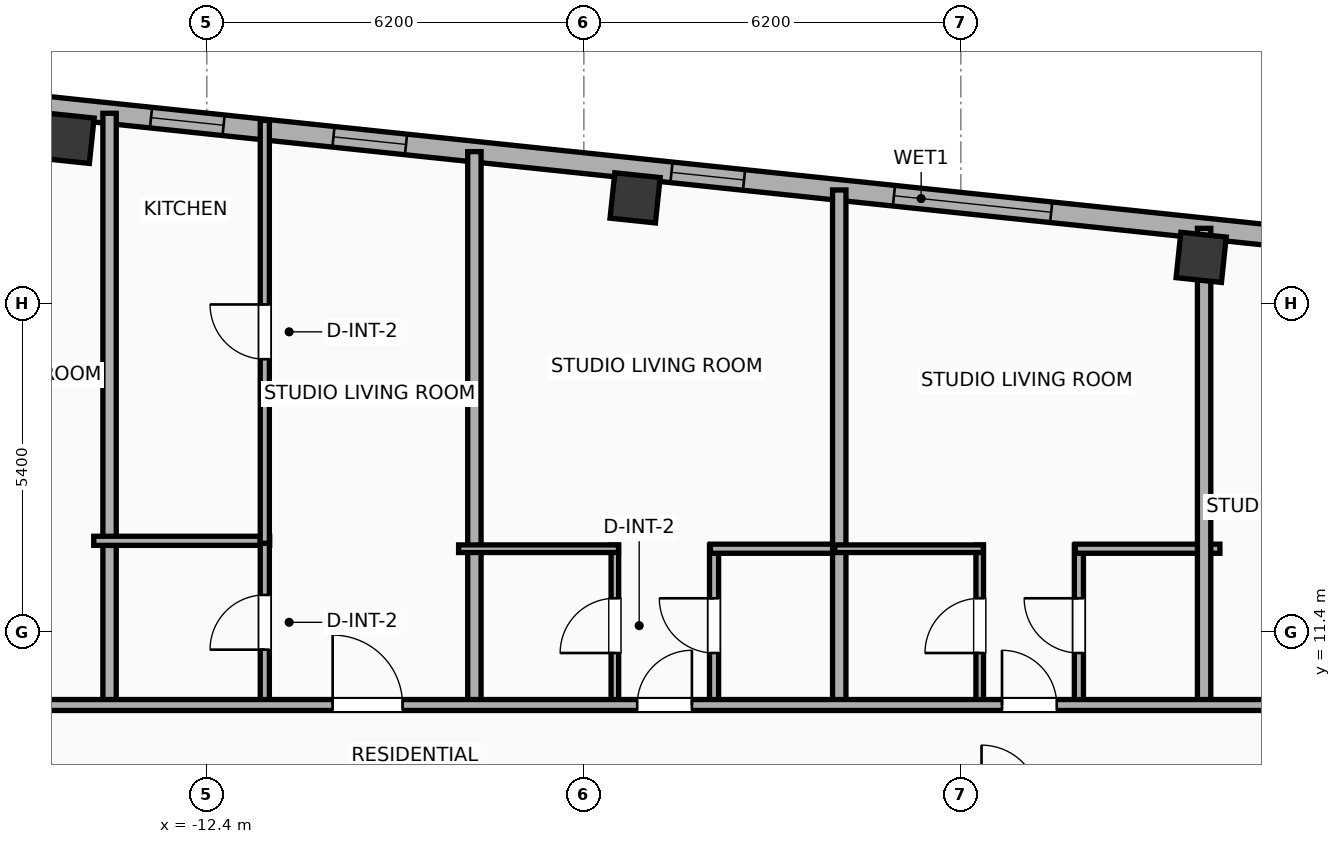
"""IFC4 building model, lengths in metres.
Left out: names, types, materials, properties, quantities, classifications, styles, units other than length and angle.
Written with IfcOpenShell. Run it as: python <this file> out.ifc"""

import sys

from ifc_helpers import new_model, si_unit, direction, frame, frame_2d, origin, origin_2d, place, context, subcontext, project, spatial, rectangle, hollow_rectangle, extrude, element, fill, save


model = new_model("IFC4")
c1 = context("Model", 3, precision=1e-05, world=origin(), true_north=direction((0.0, 1.0)))
c2 = subcontext(c1, "Body", "Model", "MODEL_VIEW")
j1 = project(units=[si_unit("LENGTHUNIT", "METRE"), si_unit("PLANEANGLEUNIT", "RADIAN")], contexts=[c1])
p1 = place(None, origin())
s1 = spatial("IfcSite", under=j1, at=p1, CompositionType="ELEMENT")
p2 = place(p1, origin())
s2 = spatial("IfcBuilding", under=s1, at=p2, CompositionType="ELEMENT")
p3 = place(p2, frame((0.0, 0.0, 295.1)))
s3 = spatial("IfcBuildingStorey", under=s2, at=p3, CompositionType="ELEMENT", Elevation=295.1)
for number, where, z_axis, x_axis in (
    (1, (3.952, 17.561, 0.0), (0.0, 0.0, 1.0), (0.995, -0.105, 0.0)),
    (2, (-5.357, 18.54, 0.0), (0.0, 0.0, 1.0), (0.995, -0.105, 0.0)),
    (3, (-14.666, 19.518, 0.0), (0.0, 0.0, 1.0), (0.995, -0.105, 0.0)),
):
    element("IfcColumn", number, at=place(p3, frame(where, z_axis=z_axis, x_axis=x_axis)), inside=s3, PredefinedType="COLUMN", context=c2, shape_type="SweptSolid", body=[
        extrude(hollow_rectangle(XDim=0.75, YDim=0.75, WallThickness=0.025, at=origin_2d()), origin(), (0.0, 0.0, 1.0), 3.9),
    ])
p4 = place(p3, frame((-23.908, 20.972, 0.0), z_axis=(0.0, 0.0, 1.0), x_axis=(0.994521888554, -0.104528528102, 0.0)))
e4 = element("IfcWall", 4, at=p4, inside=s3, PredefinedType="ELEMENTEDWALL", context=c2, shape_type="SweptSolid", body=[
    extrude(rectangle(XDim=46.766, YDim=0.34, at=frame_2d((23.383, 0.0))), origin(), (0.0, 0.0, 1.0), 3.635),
])
p5 = place(p4, frame((22.933, 0.0, 0.65)))
e5 = element("IfcOpeningElement", 5, at=p5, cuts=e4, PredefinedType="OPENING", context=c2, shape_type="SweptSolid", body=[
    extrude(rectangle(XDim=2.6, YDim=2.45, at=frame_2d((1.3, 1.225))), frame((0.0, 0.18, 0.0), z_axis=(0.0, -1.0, 0.0), x_axis=(1.0, 0.0, 0.0)), (0.0, 0.0, 1.0), 0.36),
])
p6 = place(p4, frame((1.812, 0.0, 0.75)))
e6 = element("IfcOpeningElement", 6, at=p6, cuts=e4, PredefinedType="OPENING", context=c2, shape_type="SweptSolid", body=[
    extrude(rectangle(XDim=1.2, YDim=2.05, at=frame_2d((0.6, 1.025))), frame((0.0, 0.18, 0.0), z_axis=(0.0, -1.0, 0.0), x_axis=(1.0, 0.0, 0.0)), (0.0, 0.0, 1.0), 0.36),
])
p7 = place(p4, frame((7.481, 0.0, 0.75)))
e7 = element("IfcOpeningElement", 7, at=p7, cuts=e4, PredefinedType="OPENING", context=c2, shape_type="SweptSolid", body=[
    extrude(rectangle(XDim=1.2, YDim=2.05, at=frame_2d((0.6, 1.025))), frame((0.0, 0.18, 0.0), z_axis=(0.0, -1.0, 0.0), x_axis=(1.0, 0.0, 0.0)), (0.0, 0.0, 1.0), 0.36),
])
p8 = place(p4, frame((4.464, 0.0, 0.75)))
e8 = element("IfcOpeningElement", 8, at=p8, cuts=e4, PredefinedType="OPENING", context=c2, shape_type="SweptSolid", body=[
    extrude(rectangle(XDim=1.2, YDim=2.05, at=frame_2d((0.6, 1.025))), frame((0.0, 0.18, 0.0), z_axis=(0.0, -1.0, 0.0), x_axis=(1.0, 0.0, 0.0)), (0.0, 0.0, 1.0), 0.36),
])
p9 = place(p4, frame((13.665, 0.0, 0.75)))
e9 = element("IfcOpeningElement", 9, at=p9, cuts=e4, PredefinedType="OPENING", context=c2, shape_type="SweptSolid", body=[
    extrude(rectangle(XDim=1.2, YDim=2.05, at=frame_2d((0.6, 1.025))), frame((0.0, 0.18, 0.0), z_axis=(0.0, -1.0, 0.0), x_axis=(1.0, 0.0, 0.0)), (0.0, 0.0, 1.0), 0.36),
])
p10 = place(p4, frame((10.648, 0.0, 0.75)))
e10 = element("IfcOpeningElement", 10, at=p10, cuts=e4, PredefinedType="OPENING", context=c2, shape_type="SweptSolid", body=[
    extrude(rectangle(XDim=1.2, YDim=2.05, at=frame_2d((0.6, 1.025))), frame((0.0, 0.18, 0.0), z_axis=(0.0, -1.0, 0.0), x_axis=(1.0, 0.0, 0.0)), (0.0, 0.0, 1.0), 0.36),
])
p11 = place(p4, frame((19.254, 0.0, 0.75)))
e11 = element("IfcOpeningElement", 11, at=p11, cuts=e4, PredefinedType="OPENING", context=c2, shape_type="SweptSolid", body=[
    extrude(rectangle(XDim=1.2, YDim=2.05, at=frame_2d((0.6, 1.025))), frame((0.0, 0.18, 0.0), z_axis=(0.0, -1.0, 0.0), x_axis=(1.0, 0.0, 0.0)), (0.0, 0.0, 1.0), 0.36),
])
p12 = place(p4, frame((29.247, 0.0, 0.75)))
e12 = element("IfcOpeningElement", 12, at=p12, cuts=e4, PredefinedType="OPENING", context=c2, shape_type="SweptSolid", body=[
    extrude(rectangle(XDim=1.2, YDim=2.05, at=frame_2d((0.6, 1.025))), frame((0.0, 0.18, 0.0), z_axis=(0.0, -1.0, 0.0), x_axis=(1.0, 0.0, 0.0)), (0.0, 0.0, 1.0), 0.36),
])
p13 = place(p4, frame((32.264, 0.0, 0.75)))
e13 = element("IfcOpeningElement", 13, at=p13, cuts=e4, PredefinedType="OPENING", context=c2, shape_type="SweptSolid", body=[
    extrude(rectangle(XDim=1.2, YDim=2.05, at=frame_2d((0.6, 1.025))), frame((0.0, 0.18, 0.0), z_axis=(0.0, -1.0, 0.0), x_axis=(1.0, 0.0, 0.0)), (0.0, 0.0, 1.0), 0.36),
])
p14 = place(p4, frame((35.553, 0.0, 0.75)))
e14 = element("IfcOpeningElement", 14, at=p14, cuts=e4, PredefinedType="OPENING", context=c2, shape_type="SweptSolid", body=[
    extrude(rectangle(XDim=1.2, YDim=2.05, at=frame_2d((0.6, 1.025))), frame((0.0, 0.18, 0.0), z_axis=(0.0, -1.0, 0.0), x_axis=(1.0, 0.0, 0.0)), (0.0, 0.0, 1.0), 0.36),
])
p15 = place(p4, frame((42.402, 0.0, 0.75)))
e15 = element("IfcOpeningElement", 15, at=p15, cuts=e4, PredefinedType="OPENING", context=c2, shape_type="SweptSolid", body=[
    extrude(rectangle(XDim=1.2, YDim=2.05, at=frame_2d((0.6, 1.025))), frame((0.0, 0.18, 0.0), z_axis=(0.0, -1.0, 0.0), x_axis=(1.0, 0.0, 0.0)), (0.0, 0.0, 1.0), 0.36),
])
p16 = place(p3, frame((-14.0, 10.12, 0.0), z_axis=(0.0, 0.0, 1.0), x_axis=(0.0, 1.0, 0.0)))
e16 = element("IfcWall", 16, at=p16, inside=s3, PredefinedType="PARTITIONING", context=c2, shape_type="SweptSolid", body=[
    extrude(rectangle(XDim=9.811, YDim=0.22, at=frame_2d((4.905, 0.0))), origin(), (0.0, 0.0, 1.0), 3.635),
])
p17 = place(p3, frame((-14.26, 12.9, 0.0), z_axis=(0.0, 0.0, 1.0), x_axis=(1.0, 0.0, 0.0)))
e17 = element("IfcWall", 17, at=p17, inside=s3, PredefinedType="PLUMBINGWALL", context=c2, shape_type="SweptSolid", body=[
    extrude(rectangle(XDim=2.893, YDim=0.15, at=frame_2d((1.447, 0.0))), origin(), (0.0, 0.0, 1.0), 3.635),
])
p18 = place(p3, frame((-11.447, 10.18, 0.0), z_axis=(0.0, 0.0, 1.0), x_axis=(0.0, 1.0, 0.0)))
e18 = element("IfcWall", 18, at=p18, inside=s3, PredefinedType="PLUMBINGWALL", context=c2, shape_type="SweptSolid", body=[
    extrude(rectangle(XDim=2.76, YDim=0.15, at=frame_2d((1.38, 0.0))), origin(), (0.0, 0.0, 1.0), 3.635),
])
p19 = place(p18, frame((0.93, 0.0, 0.0)))
e19 = element("IfcOpeningElement", 19, at=p19, cuts=e18, PredefinedType="OPENING", context=c2, shape_type="SweptSolid", body=[
    extrude(rectangle(XDim=0.9, YDim=2.05, at=frame_2d((0.45, 1.025))), frame((0.0, 0.085, 0.0), z_axis=(0.0, -1.0, 0.0), x_axis=(1.0, 0.0, 0.0)), (0.0, 0.0, 1.0), 0.17),
])
p20 = place(p3, frame((-11.447, 12.86, 0.0), z_axis=(0.0, 0.0, 1.0), x_axis=(0.0, 1.0, 0.0)))
e20 = element("IfcWall", 20, at=p20, inside=s3, PredefinedType="PLUMBINGWALL", context=c2, shape_type="SweptSolid", body=[
    extrude(rectangle(XDim=6.953, YDim=0.15, at=frame_2d((3.477, 0.0))), origin(), (0.0, 0.0, 1.0), 3.635),
])
p21 = place(p20, frame((3.027, 0.0, 0.0)))
e21 = element("IfcOpeningElement", 21, at=p21, cuts=e20, PredefinedType="OPENING", context=c2, shape_type="SweptSolid", body=[
    extrude(rectangle(XDim=0.9, YDim=2.05, at=frame_2d((0.45, 1.025))), frame((0.0, 0.085, 0.0), z_axis=(0.0, -1.0, 0.0), x_axis=(1.0, 0.0, 0.0)), (0.0, 0.0, 1.0), 0.17),
])
p22 = place(p3, frame((-8.0, 10.12, 0.0), z_axis=(0.0, 0.0, 1.0), x_axis=(0.0, 1.0, 0.0)))
e22 = element("IfcWall", 22, at=p22, inside=s3, PredefinedType="PARTITIONING", context=c2, shape_type="SweptSolid", body=[
    extrude(rectangle(XDim=9.18, YDim=0.22, at=frame_2d((4.59, 0.0))), origin(), (0.0, 0.0, 1.0), 3.635),
])
p23 = place(p3, frame((-5.69, 10.18, 0.0), z_axis=(0.0, 0.0, 1.0), x_axis=(0.0, 1.0, 0.0)))
e23 = element("IfcWall", 23, at=p23, inside=s3, PredefinedType="PARTITIONING", context=c2, shape_type="SweptSolid", body=[
    extrude(rectangle(XDim=2.65, YDim=0.125, at=frame_2d((1.325, 0.0))), origin(), (0.0, 0.0, 1.0), 3.635),
])
p24 = place(p23, frame((0.875, 0.0, 0.0)))
e24 = element("IfcOpeningElement", 24, at=p24, cuts=e23, PredefinedType="OPENING", context=c2, shape_type="SweptSolid", body=[
    extrude(rectangle(XDim=0.9, YDim=2.05, at=frame_2d((0.45, 1.025))), frame((0.0, 0.073, 0.0), z_axis=(0.0, -1.0, 0.0), x_axis=(1.0, 0.0, 0.0)), (0.0, 0.0, 1.0), 0.145),
])
p25 = place(p3, frame((-4.059, 10.18, 0.0), z_axis=(0.0, 0.0, 1.0), x_axis=(0.0, 1.0, 0.0)))
e25 = element("IfcWall", 25, at=p25, inside=s3, PredefinedType="PLUMBINGWALL", context=c2, shape_type="SweptSolid", body=[
    extrude(rectangle(XDim=2.65, YDim=0.15, at=frame_2d((1.325, 0.0))), origin(), (0.0, 0.0, 1.0), 3.635),
])
p26 = place(p25, frame((0.875, 0.0, 0.0)))
e26 = element("IfcOpeningElement", 26, at=p26, cuts=e25, PredefinedType="OPENING", context=c2, shape_type="SweptSolid", body=[
    extrude(rectangle(XDim=0.9, YDim=2.05, at=frame_2d((0.45, 1.025))), frame((0.0, 0.085, 0.0), z_axis=(0.0, -1.0, 0.0), x_axis=(1.0, 0.0, 0.0)), (0.0, 0.0, 1.0), 0.17),
])
p27 = place(p3, frame((-8.26, 12.77, 0.0), z_axis=(0.0, 0.0, 1.0), x_axis=(1.0, 0.0, 0.0)))
e27 = element("IfcWall", 27, at=p27, inside=s3, PredefinedType="PARTITIONING", context=c2, shape_type="SweptSolid", body=[
    extrude(rectangle(XDim=2.63, YDim=0.125, at=frame_2d((1.315, 0.0))), origin(), (0.0, 0.0, 1.0), 3.635),
])
p28 = place(p3, frame((-4.119, 12.77, 0.0), z_axis=(0.0, 0.0, 1.0), x_axis=(1.0, 0.0, 0.0)))
e28 = element("IfcWall", 28, at=p28, inside=s3, PredefinedType="PLUMBINGWALL", context=c2, shape_type="SweptSolid", body=[
    extrude(rectangle(XDim=2.194, YDim=0.15, at=frame_2d((1.097, 0.0))), origin(), (0.0, 0.0, 1.0), 3.635),
])
p29 = place(p3, frame((-2.0, 10.12, 0.0), z_axis=(0.0, 0.0, 1.0), x_axis=(0.0, 1.0, 0.0)))
e29 = element("IfcWall", 29, at=p29, inside=s3, PredefinedType="PARTITIONING", context=c2, shape_type="SweptSolid", body=[
    extrude(rectangle(XDim=8.55, YDim=0.22, at=frame_2d((4.275, 0.0))), origin(), (0.0, 0.0, 1.0), 3.635),
])
p30 = place(p3, frame((0.31, 10.18, 0.0), z_axis=(0.0, 0.0, 1.0), x_axis=(0.0, 1.0, 0.0)))
e30 = element("IfcWall", 30, at=p30, inside=s3, PredefinedType="PARTITIONING", context=c2, shape_type="SweptSolid", body=[
    extrude(rectangle(XDim=2.65, YDim=0.125, at=frame_2d((1.325, 0.0))), origin(), (0.0, 0.0, 1.0), 3.635),
])
p31 = place(p30, frame((0.875, 0.0, 0.0)))
e31 = element("IfcOpeningElement", 31, at=p31, cuts=e30, PredefinedType="OPENING", context=c2, shape_type="SweptSolid", body=[
    extrude(rectangle(XDim=0.9, YDim=2.05, at=frame_2d((0.45, 1.025))), frame((0.0, 0.073, 0.0), z_axis=(0.0, -1.0, 0.0), x_axis=(1.0, 0.0, 0.0)), (0.0, 0.0, 1.0), 0.145),
])
p32 = place(p3, frame((1.941, 10.18, 0.0), z_axis=(0.0, 0.0, 1.0), x_axis=(0.0, 1.0, 0.0)))
e32 = element("IfcWall", 32, at=p32, inside=s3, PredefinedType="PLUMBINGWALL", context=c2, shape_type="SweptSolid", body=[
    extrude(rectangle(XDim=2.65, YDim=0.15, at=frame_2d((1.325, 0.0))), origin(), (0.0, 0.0, 1.0), 3.635),
])
p33 = place(p32, frame((0.875, 0.0, 0.0)))
e33 = element("IfcOpeningElement", 33, at=p33, cuts=e32, PredefinedType="OPENING", context=c2, shape_type="SweptSolid", body=[
    extrude(rectangle(XDim=0.9, YDim=2.05, at=frame_2d((0.45, 1.025))), frame((0.0, 0.085, 0.0), z_axis=(0.0, -1.0, 0.0), x_axis=(1.0, 0.0, 0.0)), (0.0, 0.0, 1.0), 0.17),
])
p34 = place(p3, frame((-2.075, 12.77, 0.0), z_axis=(0.0, 0.0, 1.0), x_axis=(1.0, 0.0, 0.0)))
e34 = element("IfcWall", 34, at=p34, inside=s3, PredefinedType="PARTITIONING", context=c2, shape_type="SweptSolid", body=[
    extrude(rectangle(XDim=2.445, YDim=0.125, at=frame_2d((1.223, 0.0))), origin(), (0.0, 0.0, 1.0), 3.635),
])
p35 = place(p3, frame((1.881, 12.77, 0.0), z_axis=(0.0, 0.0, 1.0), x_axis=(1.0, 0.0, 0.0)))
e35 = element("IfcWall", 35, at=p35, inside=s3, PredefinedType="PLUMBINGWALL", context=c2, shape_type="SweptSolid", body=[
    extrude(rectangle(XDim=2.379, YDim=0.15, at=frame_2d((1.189, 0.0))), origin(), (0.0, 0.0, 1.0), 3.635),
])
p36 = place(p3, frame((4.0, 10.12, 0.0), z_axis=(0.0, 0.0, 1.0), x_axis=(0.0, 1.0, 0.0)))
e36 = element("IfcWall", 36, at=p36, inside=s3, PredefinedType="PARTITIONING", context=c2, shape_type="SweptSolid", body=[
    extrude(rectangle(XDim=7.919, YDim=0.22, at=frame_2d((3.959, 0.0))), origin(), (0.0, 0.0, 1.0), 3.075),
])
p37 = place(p3, frame((-28.506, 10.2, 0.0), z_axis=(0.0, 0.0, 1.0), x_axis=(1.0, 0.0, 0.0)))
e37 = element("IfcWall", 37, at=p37, inside=s3, PredefinedType="PARTITIONING", context=c2, shape_type="SweptSolid", body=[
    extrude(rectangle(XDim=53.956, YDim=0.18, at=frame_2d((26.978, 0.0))), origin(), (0.0, 0.0, 1.0), 3.635),
])
p38 = place(p37, frame((3.828, 0.0, 0.0)))
e38 = element("IfcOpeningElement", 38, at=p38, cuts=e37, PredefinedType="OPENING", context=c2, shape_type="SweptSolid", body=[
    extrude(rectangle(XDim=1.15, YDim=2.05, at=frame_2d((0.575, 1.025))), frame((0.0, 0.1, 0.0), z_axis=(0.0, -1.0, 0.0), x_axis=(1.0, 0.0, 0.0)), (0.0, 0.0, 1.0), 0.2),
])
p39 = place(p37, frame((12.029, 0.0, 0.0)))
e39 = element("IfcOpeningElement", 39, at=p39, cuts=e37, PredefinedType="OPENING", context=c2, shape_type="SweptSolid", body=[
    extrude(rectangle(XDim=1.15, YDim=2.05, at=frame_2d((0.575, 1.025))), frame((0.0, 0.1, 0.0), z_axis=(0.0, -1.0, 0.0), x_axis=(1.0, 0.0, 0.0)), (0.0, 0.0, 1.0), 0.2),
])
p40 = place(p37, frame((18.175, 0.0, 0.0)))
e40 = element("IfcOpeningElement", 40, at=p40, cuts=e37, PredefinedType="OPENING", context=c2, shape_type="SweptSolid", body=[
    extrude(rectangle(XDim=1.15, YDim=2.05, at=frame_2d((0.575, 1.025))), frame((0.0, 0.1, 0.0), z_axis=(0.0, -1.0, 0.0), x_axis=(1.0, 0.0, 0.0)), (0.0, 0.0, 1.0), 0.2),
])
p41 = place(p37, frame((23.183, 0.0, 0.0)))
e41 = element("IfcOpeningElement", 41, at=p41, cuts=e37, PredefinedType="OPENING", context=c2, shape_type="SweptSolid", body=[
    extrude(rectangle(XDim=0.9, YDim=2.05, at=frame_2d((0.45, 1.025))), frame((0.0, 0.1, 0.0), z_axis=(0.0, -1.0, 0.0), x_axis=(1.0, 0.0, 0.0)), (0.0, 0.0, 1.0), 0.2),
])
p42 = place(p37, frame((29.182, 0.0, 0.0)))
e42 = element("IfcOpeningElement", 42, at=p42, cuts=e37, PredefinedType="OPENING", context=c2, shape_type="SweptSolid", body=[
    extrude(rectangle(XDim=0.9, YDim=2.05, at=frame_2d((0.45, 1.025))), frame((0.0, 0.1, 0.0), z_axis=(0.0, -1.0, 0.0), x_axis=(1.0, 0.0, 0.0)), (0.0, 0.0, 1.0), 0.2),
])
p43 = place(p37, frame((33.735, 0.0, 0.0)))
e43 = element("IfcOpeningElement", 43, at=p43, cuts=e37, PredefinedType="OPENING", context=c2, shape_type="SweptSolid", body=[
    extrude(rectangle(XDim=1.15, YDim=2.05, at=frame_2d((0.575, 1.025))), frame((0.0, 0.1, 0.0), z_axis=(0.0, -1.0, 0.0), x_axis=(1.0, 0.0, 0.0)), (0.0, 0.0, 1.0), 0.2),
])
p44 = place(p37, frame((41.182, 0.0, 0.0)))
e44 = element("IfcOpeningElement", 44, at=p44, cuts=e37, PredefinedType="OPENING", context=c2, shape_type="SweptSolid", body=[
    extrude(rectangle(XDim=0.9, YDim=2.05, at=frame_2d((0.45, 1.025))), frame((0.0, 0.1, 0.0), z_axis=(0.0, -1.0, 0.0), x_axis=(1.0, 0.0, 0.0)), (0.0, 0.0, 1.0), 0.2),
])
p45 = place(p37, frame((49.114, 0.0, 0.0)))
e45 = element("IfcOpeningElement", 45, at=p45, cuts=e37, PredefinedType="OPENING", context=c2, shape_type="SweptSolid", body=[
    extrude(rectangle(XDim=0.9, YDim=2.05, at=frame_2d((0.45, 1.025))), frame((0.0, 0.1, 0.0), z_axis=(0.0, -1.0, 0.0), x_axis=(1.0, 0.0, 0.0)), (0.0, 0.0, 1.0), 0.2),
])
p46 = place(p5, origin())
e46 = element("IfcWindow", 46, at=p46, inside=s3, PartitioningType="SINGLE_PANEL", PredefinedType="WINDOW", context=c2, shape_type="SweptSolid", body=[
    extrude(rectangle(XDim=2.6, YDim=2.45, at=frame_2d((1.3, 1.225))), frame((0.0, 0.03, 0.0), z_axis=(0.0, -1.0, 0.0), x_axis=(1.0, 0.0, 0.0)), (0.0, 0.0, 1.0), 0.06),
])
fill(e5, e46)
p47 = place(p9, origin())
e47 = element("IfcWindow", 47, at=p47, inside=s3, PartitioningType="SINGLE_PANEL", PredefinedType="WINDOW", context=c2, shape_type="SweptSolid", body=[
    extrude(rectangle(XDim=1.2, YDim=2.05, at=frame_2d((0.6, 1.025))), frame((0.0, 0.03, 0.0), z_axis=(0.0, -1.0, 0.0), x_axis=(1.0, 0.0, 0.0)), (0.0, 0.0, 1.0), 0.06),
])
fill(e9, e47)
p48 = place(p10, origin())
e48 = element("IfcWindow", 48, at=p48, inside=s3, PartitioningType="SINGLE_PANEL", PredefinedType="WINDOW", context=c2, shape_type="SweptSolid", body=[
    extrude(rectangle(XDim=1.2, YDim=2.05, at=frame_2d((0.6, 1.025))), frame((0.0, 0.03, 0.0), z_axis=(0.0, -1.0, 0.0), x_axis=(1.0, 0.0, 0.0)), (0.0, 0.0, 1.0), 0.06),
])
fill(e10, e48)
p49 = place(p11, origin())
e49 = element("IfcWindow", 49, at=p49, inside=s3, PartitioningType="SINGLE_PANEL", PredefinedType="WINDOW", context=c2, shape_type="SweptSolid", body=[
    extrude(rectangle(XDim=1.2, YDim=2.05, at=frame_2d((0.6, 1.025))), frame((0.0, 0.03, 0.0), z_axis=(0.0, -1.0, 0.0), x_axis=(1.0, 0.0, 0.0)), (0.0, 0.0, 1.0), 0.06),
])
fill(e11, e49)
p50 = place(p19, origin())
e50 = element("IfcDoor", 50, at=p50, inside=s3, OperationType="SINGLE_SWING_LEFT", PredefinedType="DOOR", context=c2, shape_type="SweptSolid", body=[
    extrude(rectangle(XDim=0.9, YDim=2.05, at=frame_2d((0.45, 1.025))), frame((0.0, 0.025, 0.0), z_axis=(0.0, -1.0, 0.0), x_axis=(1.0, 0.0, 0.0)), (0.0, 0.0, 1.0), 0.05),
])
fill(e19, e50)
p51 = place(p21, origin())
e51 = element("IfcDoor", 51, at=p51, inside=s3, OperationType="SINGLE_SWING_RIGHT", PredefinedType="DOOR", context=c2, shape_type="SweptSolid", body=[
    extrude(rectangle(XDim=0.9, YDim=2.05, at=frame_2d((0.45, 1.025))), frame((0.0, 0.025, 0.0), z_axis=(0.0, -1.0, 0.0), x_axis=(1.0, 0.0, 0.0)), (0.0, 0.0, 1.0), 0.05),
])
fill(e21, e51)
p52 = place(p24, origin())
e52 = element("IfcDoor", 52, at=p52, inside=s3, OperationType="SINGLE_SWING_LEFT", PredefinedType="DOOR", context=c2, shape_type="SweptSolid", body=[
    extrude(rectangle(XDim=0.9, YDim=2.05, at=frame_2d((0.45, 1.025))), frame((0.0, 0.025, 0.0), z_axis=(0.0, -1.0, 0.0), x_axis=(1.0, 0.0, 0.0)), (0.0, 0.0, 1.0), 0.05),
])
fill(e24, e52)
p53 = place(p26, origin())
e53 = element("IfcDoor", 53, at=p53, inside=s3, OperationType="SINGLE_SWING_RIGHT", PredefinedType="DOOR", context=c2, shape_type="SweptSolid", body=[
    extrude(rectangle(XDim=0.9, YDim=2.05, at=frame_2d((0.45, 1.025))), frame((0.0, 0.025, 0.0), z_axis=(0.0, -1.0, 0.0), x_axis=(1.0, 0.0, 0.0)), (0.0, 0.0, 1.0), 0.05),
])
fill(e26, e53)
p54 = place(p31, origin())
e54 = element("IfcDoor", 54, at=p54, inside=s3, OperationType="SINGLE_SWING_LEFT", PredefinedType="DOOR", context=c2, shape_type="SweptSolid", body=[
    extrude(rectangle(XDim=0.9, YDim=2.05, at=frame_2d((0.45, 1.025))), frame((0.0, 0.025, 0.0), z_axis=(0.0, -1.0, 0.0), x_axis=(1.0, 0.0, 0.0)), (0.0, 0.0, 1.0), 0.05),
])
fill(e31, e54)
p55 = place(p33, origin())
e55 = element("IfcDoor", 55, at=p55, inside=s3, OperationType="SINGLE_SWING_RIGHT", PredefinedType="DOOR", context=c2, shape_type="SweptSolid", body=[
    extrude(rectangle(XDim=0.9, YDim=2.05, at=frame_2d((0.45, 1.025))), frame((0.0, 0.025, 0.0), z_axis=(0.0, -1.0, 0.0), x_axis=(1.0, 0.0, 0.0)), (0.0, 0.0, 1.0), 0.05),
])
fill(e33, e55)
p56 = place(p40, origin())
e56 = element("IfcDoor", 56, at=p56, inside=s3, OperationType="SINGLE_SWING_LEFT", PredefinedType="DOOR", context=c2, shape_type="SweptSolid", body=[
    extrude(rectangle(XDim=1.15, YDim=2.05, at=frame_2d((0.575, 1.025))), frame((0.0, 0.025, 0.0), z_axis=(0.0, -1.0, 0.0), x_axis=(1.0, 0.0, 0.0)), (0.0, 0.0, 1.0), 0.05),
])
fill(e40, e56)
p57 = place(p41, origin())
e57 = element("IfcDoor", 57, at=p57, inside=s3, OperationType="SINGLE_SWING_RIGHT", PredefinedType="DOOR", context=c2, shape_type="SweptSolid", body=[
    extrude(rectangle(XDim=0.9, YDim=2.05, at=frame_2d((0.45, 1.025))), frame((0.0, 0.025, 0.0), z_axis=(0.0, -1.0, 0.0), x_axis=(1.0, 0.0, 0.0)), (0.0, 0.0, 1.0), 0.05),
])
fill(e41, e57)
p58 = place(p42, origin())
e58 = element("IfcDoor", 58, at=p58, inside=s3, OperationType="SINGLE_SWING_LEFT", PredefinedType="DOOR", context=c2, shape_type="SweptSolid", body=[
    extrude(rectangle(XDim=0.9, YDim=2.05, at=frame_2d((0.45, 1.025))), frame((0.0, 0.025, 0.0), z_axis=(0.0, -1.0, 0.0), x_axis=(1.0, 0.0, 0.0)), (0.0, 0.0, 1.0), 0.05),
])
fill(e42, e58)
save(model, sys.argv[1])
